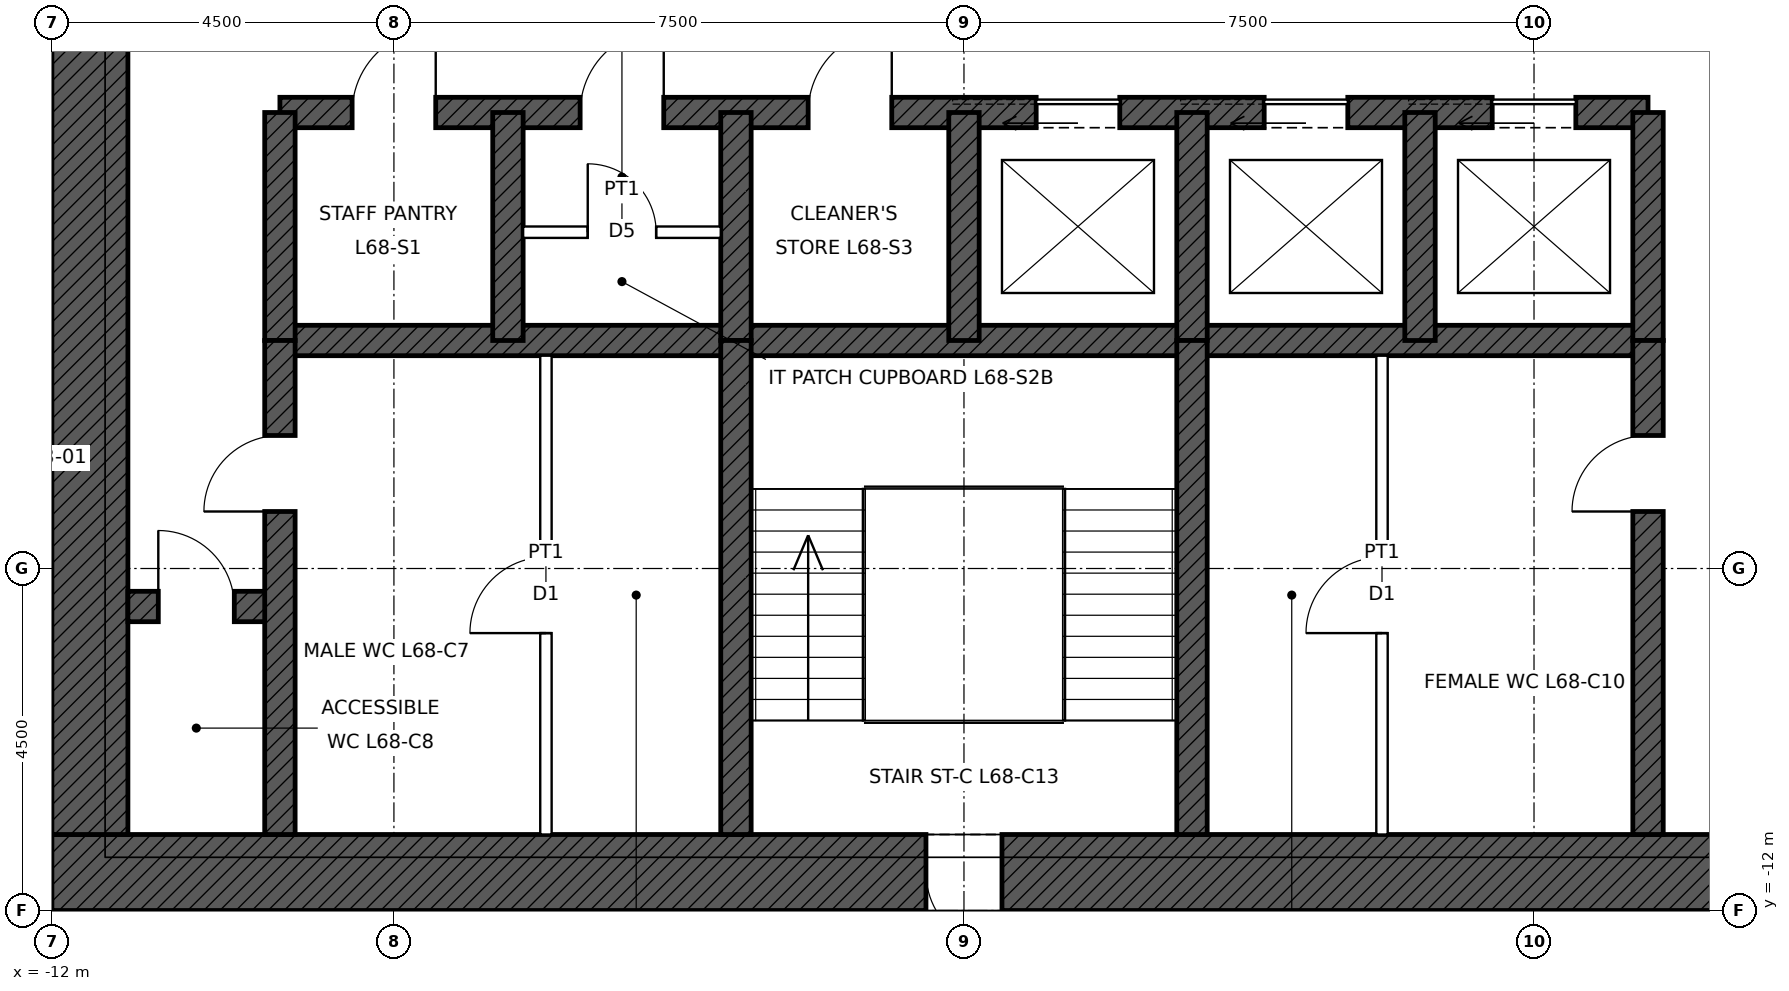
"""IFC4 building model, lengths in metres.
Left out: names, types, materials, properties, quantities, classifications, styles, units other than length and angle.
Written with IfcOpenShell. Run it as: python <this file> out.ifc"""

import sys

from ifc_helpers import new_model, si_unit, direction, frame, frame_2d, origin, place, context, subcontext, project, spatial, rectangle, extrude, element, fill, save


model = new_model("IFC4")
c1 = context("Model", 3, precision=1e-05, world=origin(), true_north=direction((0.0, 1.0)))
c2 = subcontext(c1, "Body", "Model", "MODEL_VIEW")
j1 = project(units=[si_unit("LENGTHUNIT", "METRE"), si_unit("PLANEANGLEUNIT", "RADIAN")], contexts=[c1])
p1 = place(None, origin())
s1 = spatial("IfcSite", under=j1, at=p1, CompositionType="ELEMENT")
p2 = place(p1, origin())
s2 = spatial("IfcBuilding", under=s1, at=p2, CompositionType="ELEMENT")
p3 = place(p2, frame((0.0, 0.0, 307.9)))
s3 = spatial("IfcBuildingStorey", under=s2, at=p3, CompositionType="ELEMENT", Elevation=307.9)
p4 = place(p3, frame((12.0, -11.5, 0.0), z_axis=(0.0, 0.0, 1.0), x_axis=(-1.0, 0.0, 0.0)))
e1 = element("IfcWall", 1, at=p4, inside=s3, PredefinedType="SHEAR", context=c2, shape_type="SweptSolid", body=[
    extrude(rectangle(XDim=24.0, YDim=1.0, at=frame_2d((12.0, 0.0))), origin(), (0.0, 0.0, 1.0), 4.0),
])
p5 = place(p4, frame((11.5, 0.0, 0.0)))
e2 = element("IfcOpeningElement", 2, at=p5, cuts=e1, PredefinedType="OPENING", context=c2, shape_type="SweptSolid", body=[
    extrude(rectangle(XDim=1.0, YDim=2.1, at=frame_2d((0.5, 1.05))), frame((0.0, 0.51, 0.0), z_axis=(0.0, -1.0, 0.0), x_axis=(1.0, 0.0, 0.0)), (0.0, 0.0, 1.0), 1.02),
])
p6 = place(p4, frame((1.0, 0.0, 0.0)))
e3 = element("IfcOpeningElement", 3, at=p6, cuts=e1, PredefinedType="OPENING", context=c2, shape_type="SweptSolid", body=[
    extrude(rectangle(XDim=1.0, YDim=2.4, at=frame_2d((0.5, 1.2))), frame((0.0, 0.51, 0.0), z_axis=(0.0, -1.0, 0.0), x_axis=(1.0, 0.0, 0.0)), (0.0, 0.0, 1.0), 1.02),
])
p7 = place(p3, frame((-11.5, -11.0, 0.0), z_axis=(0.0, 0.0, 1.0), x_axis=(0.0, 1.0, 0.0)))
e4 = element("IfcWall", 4, at=p7, inside=s3, PredefinedType="SHEAR", context=c2, shape_type="SweptSolid", body=[
    extrude(rectangle(XDim=22.0, YDim=1.0, at=frame_2d((11.0, 0.0))), origin(), (0.0, 0.0, 1.0), 4.0),
])
p8 = place(p7, frame((10.5, 0.0, 0.0)))
e5 = element("IfcOpeningElement", 5, at=p8, cuts=e4, PredefinedType="OPENING", context=c2, shape_type="SweptSolid", body=[
    extrude(rectangle(XDim=1.0, YDim=2.4, at=frame_2d((0.5, 1.2))), frame((0.0, 0.51, 0.0), z_axis=(0.0, -1.0, 0.0), x_axis=(1.0, 0.0, 0.0)), (0.0, 0.0, 1.0), 1.02),
])
p9 = place(p3, frame((-9.0, -1.5, 0.0), z_axis=(0.0, 0.0, 1.0), x_axis=(1.0, 0.0, 0.0)))
e6 = element("IfcWall", 6, at=p9, inside=s3, PredefinedType="SHEAR", context=c2, shape_type="SweptSolid", body=[
    extrude(rectangle(XDim=18.0, YDim=0.4, at=frame_2d((9.0, 0.0))), origin(), (0.0, 0.0, 1.0), 4.0),
])
p10 = place(p9, frame((9.95, 0.0, 0.0)))
e7 = element("IfcOpeningElement", 7, at=p10, cuts=e6, PredefinedType="OPENING", context=c2, shape_type="SweptSolid", body=[
    extrude(rectangle(XDim=1.1, YDim=2.1, at=frame_2d((0.55, 1.05))), frame((0.0, 0.21, 0.0), z_axis=(0.0, -1.0, 0.0), x_axis=(1.0, 0.0, 0.0)), (0.0, 0.0, 1.0), 0.42),
])
p11 = place(p9, frame((12.95, 0.0, 0.0)))
e8 = element("IfcOpeningElement", 8, at=p11, cuts=e6, PredefinedType="OPENING", context=c2, shape_type="SweptSolid", body=[
    extrude(rectangle(XDim=1.1, YDim=2.1, at=frame_2d((0.55, 1.05))), frame((0.0, 0.21, 0.0), z_axis=(0.0, -1.0, 0.0), x_axis=(1.0, 0.0, 0.0)), (0.0, 0.0, 1.0), 0.42),
])
p12 = place(p9, frame((15.95, 0.0, 0.0)))
e9 = element("IfcOpeningElement", 9, at=p12, cuts=e6, PredefinedType="OPENING", context=c2, shape_type="SweptSolid", body=[
    extrude(rectangle(XDim=1.1, YDim=2.1, at=frame_2d((0.55, 1.05))), frame((0.0, 0.21, 0.0), z_axis=(0.0, -1.0, 0.0), x_axis=(1.0, 0.0, 0.0)), (0.0, 0.0, 1.0), 0.42),
])
p13 = place(p9, frame((0.95, 0.0, 0.0)))
e10 = element("IfcOpeningElement", 10, at=p13, cuts=e6, PredefinedType="OPENING", context=c2, shape_type="SweptSolid", body=[
    extrude(rectangle(XDim=1.1, YDim=2.1, at=frame_2d((0.55, 1.05))), frame((0.0, 0.21, 0.0), z_axis=(0.0, -1.0, 0.0), x_axis=(1.0, 0.0, 0.0)), (0.0, 0.0, 1.0), 0.42),
])
p14 = place(p9, frame((3.95, 0.0, 0.0)))
e11 = element("IfcOpeningElement", 11, at=p14, cuts=e6, PredefinedType="OPENING", context=c2, shape_type="SweptSolid", body=[
    extrude(rectangle(XDim=1.1, YDim=2.1, at=frame_2d((0.55, 1.05))), frame((0.0, 0.21, 0.0), z_axis=(0.0, -1.0, 0.0), x_axis=(1.0, 0.0, 0.0)), (0.0, 0.0, 1.0), 0.42),
])
p15 = place(p9, frame((6.95, 0.0, 0.0)))
e12 = element("IfcOpeningElement", 12, at=p15, cuts=e6, PredefinedType="OPENING", context=c2, shape_type="SweptSolid", body=[
    extrude(rectangle(XDim=1.1, YDim=2.1, at=frame_2d((0.55, 1.05))), frame((0.0, 0.21, 0.0), z_axis=(0.0, -1.0, 0.0), x_axis=(1.0, 0.0, 0.0)), (0.0, 0.0, 1.0), 0.42),
])
p16 = place(p3, frame((-9.0, -4.5, 0.0), z_axis=(0.0, 0.0, 1.0), x_axis=(1.0, 0.0, 0.0)))
e13 = element("IfcWall", 13, at=p16, inside=s3, PredefinedType="SHEAR", context=c2, shape_type="SweptSolid", body=[
    extrude(rectangle(XDim=18.0, YDim=0.4, at=frame_2d((9.0, 0.0))), origin(), (0.0, 0.0, 1.0), 4.0),
])
p17 = place(p3, frame((-11.0, -8.0, 0.0), z_axis=(0.0, 0.0, 1.0), x_axis=(1.0, 0.0, 0.0)))
e14 = element("IfcWall", 14, at=p17, inside=s3, PredefinedType="SHEAR", context=c2, shape_type="SweptSolid", body=[
    extrude(rectangle(XDim=2.0, YDim=0.4, at=frame_2d((1.0, 0.0))), origin(), (0.0, 0.0, 1.0), 4.0),
])
p18 = place(p17, frame((0.4, 0.0, 0.0)))
e15 = element("IfcOpeningElement", 15, at=p18, cuts=e14, PredefinedType="OPENING", context=c2, shape_type="SweptSolid", body=[
    extrude(rectangle(XDim=1.0, YDim=2.1, at=frame_2d((0.5, 1.05))), frame((0.0, 0.21, 0.0), z_axis=(0.0, -1.0, 0.0), x_axis=(1.0, 0.0, 0.0)), (0.0, 0.0, 1.0), 0.42),
])
for number, where, z_axis, x_axis in (
    (16, (-9.0, -4.5, 0.0), (0.0, 0.0, 1.0), (0.0, 1.0, 0.0)),
    (17, (9.0, -4.5, 0.0), (0.0, 0.0, 1.0), (0.0, 1.0, 0.0)),
    (18, (-6.0, -4.5, 0.0), (0.0, 0.0, 1.0), (0.0, 1.0, 0.0)),
    (19, (-3.0, -4.5, 0.0), (0.0, 0.0, 1.0), (0.0, 1.0, 0.0)),
    (20, (0.0, -4.5, 0.0), (0.0, 0.0, 1.0), (0.0, 1.0, 0.0)),
    (21, (3.0, -4.5, 0.0), (0.0, 0.0, 1.0), (0.0, 1.0, 0.0)),
    (22, (6.0, -4.5, 0.0), (0.0, 0.0, 1.0), (0.0, 1.0, 0.0)),
):
    element("IfcWall", number, at=place(p3, frame(where, z_axis=z_axis, x_axis=x_axis)), inside=s3, PredefinedType="SHEAR", context=c2, shape_type="SweptSolid", body=[
        extrude(rectangle(XDim=3.0, YDim=0.4, at=frame_2d((1.5, 0.0))), origin(), (0.0, 0.0, 1.0), 4.0),
    ])
p19 = place(p3, frame((-9.0, -11.0, 0.0), z_axis=(0.0, 0.0, 1.0), x_axis=(0.0, 1.0, 0.0)))
e23 = element("IfcWall", 23, at=p19, inside=s3, PredefinedType="SHEAR", context=c2, shape_type="SweptSolid", body=[
    extrude(rectangle(XDim=6.5, YDim=0.4, at=frame_2d((3.25, 0.0))), origin(), (0.0, 0.0, 1.0), 4.0),
])
p20 = place(p19, frame((4.25, 0.0, 0.0)))
e24 = element("IfcOpeningElement", 24, at=p20, cuts=e23, PredefinedType="OPENING", context=c2, shape_type="SweptSolid", body=[
    extrude(rectangle(XDim=1.0, YDim=2.1, at=frame_2d((0.5, 1.05))), frame((0.0, 0.21, 0.0), z_axis=(0.0, -1.0, 0.0), x_axis=(1.0, 0.0, 0.0)), (0.0, 0.0, 1.0), 0.42),
])
p21 = place(p3, frame((9.0, -11.0, 0.0), z_axis=(0.0, 0.0, 1.0), x_axis=(0.0, 1.0, 0.0)))
e25 = element("IfcWall", 25, at=p21, inside=s3, PredefinedType="SHEAR", context=c2, shape_type="SweptSolid", body=[
    extrude(rectangle(XDim=6.5, YDim=0.4, at=frame_2d((3.25, 0.0))), origin(), (0.0, 0.0, 1.0), 4.0),
])
p22 = place(p21, frame((4.25, 0.0, 0.0)))
e26 = element("IfcOpeningElement", 26, at=p22, cuts=e25, PredefinedType="OPENING", context=c2, shape_type="SweptSolid", body=[
    extrude(rectangle(XDim=1.0, YDim=2.1, at=frame_2d((0.5, 1.05))), frame((0.0, 0.21, 0.0), z_axis=(0.0, -1.0, 0.0), x_axis=(1.0, 0.0, 0.0)), (0.0, 0.0, 1.0), 0.42),
])
for number, where, z_axis, x_axis in (
    (27, (-3.0, -11.0, 0.0), (0.0, 0.0, 1.0), (0.0, 1.0, 0.0)),
    (28, (3.0, -11.0, 0.0), (0.0, 0.0, 1.0), (0.0, 1.0, 0.0)),
):
    element("IfcWall", number, at=place(p3, frame(where, z_axis=z_axis, x_axis=x_axis)), inside=s3, PredefinedType="SHEAR", context=c2, shape_type="SweptSolid", body=[
        extrude(rectangle(XDim=6.5, YDim=0.4, at=frame_2d((3.25, 0.0))), origin(), (0.0, 0.0, 1.0), 4.0),
    ])
p23 = place(p3, frame((-5.5, -11.0, 0.0), z_axis=(0.0, 0.0, 1.0), x_axis=(0.0, 1.0, 0.0)))
e29 = element("IfcWall", 29, at=p23, inside=s3, PredefinedType="PARTITIONING", context=c2, shape_type="SweptSolid", body=[
    extrude(rectangle(XDim=6.3, YDim=0.15, at=frame_2d((3.15, 0.0))), origin(), (0.0, 0.0, 1.0), 3.75),
])
p24 = place(p23, frame((2.65, 0.0, 0.0)))
e30 = element("IfcOpeningElement", 30, at=p24, cuts=e29, PredefinedType="OPENING", context=c2, shape_type="SweptSolid", body=[
    extrude(rectangle(XDim=1.0, YDim=2.1, at=frame_2d((0.5, 1.05))), frame((0.0, 0.085, 0.0), z_axis=(0.0, -1.0, 0.0), x_axis=(1.0, 0.0, 0.0)), (0.0, 0.0, 1.0), 0.17),
])
p25 = place(p3, frame((5.5, -11.0, 0.0), z_axis=(0.0, 0.0, 1.0), x_axis=(0.0, 1.0, 0.0)))
e31 = element("IfcWall", 31, at=p25, inside=s3, PredefinedType="PARTITIONING", context=c2, shape_type="SweptSolid", body=[
    extrude(rectangle(XDim=6.3, YDim=0.15, at=frame_2d((3.15, 0.0))), origin(), (0.0, 0.0, 1.0), 3.75),
])
p26 = place(p25, frame((2.65, 0.0, 0.0)))
e32 = element("IfcOpeningElement", 32, at=p26, cuts=e31, PredefinedType="OPENING", context=c2, shape_type="SweptSolid", body=[
    extrude(rectangle(XDim=1.0, YDim=2.1, at=frame_2d((0.5, 1.05))), frame((0.0, 0.085, 0.0), z_axis=(0.0, -1.0, 0.0), x_axis=(1.0, 0.0, 0.0)), (0.0, 0.0, 1.0), 0.17),
])
p27 = place(p3, frame((-5.8, -3.075, 0.0), z_axis=(0.0, 0.0, 1.0), x_axis=(1.0, 0.0, 0.0)))
e33 = element("IfcWall", 33, at=p27, inside=s3, PredefinedType="PARTITIONING", context=c2, shape_type="SweptSolid", body=[
    extrude(rectangle(XDim=2.6, YDim=0.15, at=frame_2d((1.3, 0.0))), origin(), (0.0, 0.0, 1.0), 3.75),
])
p28 = place(p27, frame((0.85, 0.0, 0.0)))
e34 = element("IfcOpeningElement", 34, at=p28, cuts=e33, PredefinedType="OPENING", context=c2, shape_type="SweptSolid", body=[
    extrude(rectangle(XDim=0.9, YDim=2.1, at=frame_2d((0.45, 1.05))), frame((0.0, 0.085, 0.0), z_axis=(0.0, -1.0, 0.0), x_axis=(1.0, 0.0, 0.0)), (0.0, 0.0, 1.0), 0.17),
])
p29 = place(p5, origin())
e35 = element("IfcDoor", 35, at=p29, inside=s3, OperationType="SINGLE_SWING_LEFT", PredefinedType="DOOR", context=c2, shape_type="SweptSolid", body=[
    extrude(rectangle(XDim=1.0, YDim=2.1, at=frame_2d((0.5, 1.05))), frame((0.0, 0.485, 0.0), z_axis=(0.0, -1.0, 0.0), x_axis=(1.0, 0.0, 0.0)), (0.0, 0.0, 1.0), 0.05),
])
fill(e2, e35)
p30 = place(p20, origin())
e36 = element("IfcDoor", 36, at=p30, inside=s3, OperationType="SINGLE_SWING_LEFT", PredefinedType="DOOR", context=c2, shape_type="SweptSolid", body=[
    extrude(rectangle(XDim=1.0, YDim=2.1, at=frame_2d((0.5, 1.05))), frame((0.0, 0.025, 0.0), z_axis=(0.0, -1.0, 0.0), x_axis=(1.0, 0.0, 0.0)), (0.0, 0.0, 1.0), 0.05),
])
fill(e24, e36)
p31 = place(p22, origin())
e37 = element("IfcDoor", 37, at=p31, inside=s3, OperationType="SINGLE_SWING_LEFT", PredefinedType="DOOR", context=c2, shape_type="SweptSolid", body=[
    extrude(rectangle(XDim=1.0, YDim=2.1, at=frame_2d((0.5, 1.05))), frame((0.0, 0.025, 0.0), z_axis=(0.0, -1.0, 0.0), x_axis=(1.0, 0.0, 0.0)), (0.0, 0.0, 1.0), 0.05),
])
fill(e26, e37)
p32 = place(p18, origin())
e38 = element("IfcDoor", 38, at=p32, inside=s3, OperationType="SINGLE_SWING_LEFT", PredefinedType="DOOR", context=c2, shape_type="SweptSolid", body=[
    extrude(rectangle(XDim=1.0, YDim=2.1, at=frame_2d((0.5, 1.05))), frame((0.0, 0.025, 0.0), z_axis=(0.0, -1.0, 0.0), x_axis=(1.0, 0.0, 0.0)), (0.0, 0.0, 1.0), 0.05),
])
fill(e15, e38)
p33 = place(p10, origin())
e39 = element("IfcDoor", 39, at=p33, inside=s3, OperationType="SLIDING_TO_LEFT", PredefinedType="DOOR", context=c2, shape_type="SweptSolid", body=[
    extrude(rectangle(XDim=1.1, YDim=2.1, at=frame_2d((0.55, 1.05))), frame((0.0, 0.025, 0.0), z_axis=(0.0, -1.0, 0.0), x_axis=(1.0, 0.0, 0.0)), (0.0, 0.0, 1.0), 0.05),
])
fill(e7, e39)
p34 = place(p11, origin())
e40 = element("IfcDoor", 40, at=p34, inside=s3, OperationType="SLIDING_TO_LEFT", PredefinedType="DOOR", context=c2, shape_type="SweptSolid", body=[
    extrude(rectangle(XDim=1.1, YDim=2.1, at=frame_2d((0.55, 1.05))), frame((0.0, 0.025, 0.0), z_axis=(0.0, -1.0, 0.0), x_axis=(1.0, 0.0, 0.0)), (0.0, 0.0, 1.0), 0.05),
])
fill(e8, e40)
p35 = place(p12, origin())
e41 = element("IfcDoor", 41, at=p35, inside=s3, OperationType="SLIDING_TO_LEFT", PredefinedType="DOOR", context=c2, shape_type="SweptSolid", body=[
    extrude(rectangle(XDim=1.1, YDim=2.1, at=frame_2d((0.55, 1.05))), frame((0.0, 0.025, 0.0), z_axis=(0.0, -1.0, 0.0), x_axis=(1.0, 0.0, 0.0)), (0.0, 0.0, 1.0), 0.05),
])
fill(e9, e41)
p36 = place(p24, origin())
e42 = element("IfcDoor", 42, at=p36, inside=s3, OperationType="SINGLE_SWING_LEFT", PredefinedType="DOOR", context=c2, shape_type="SweptSolid", body=[
    extrude(rectangle(XDim=1.0, YDim=2.1, at=frame_2d((0.5, 1.05))), frame((0.0, 0.025, 0.0), z_axis=(0.0, -1.0, 0.0), x_axis=(1.0, 0.0, 0.0)), (0.0, 0.0, 1.0), 0.05),
])
fill(e30, e42)
p37 = place(p26, origin())
e43 = element("IfcDoor", 43, at=p37, inside=s3, OperationType="SINGLE_SWING_LEFT", PredefinedType="DOOR", context=c2, shape_type="SweptSolid", body=[
    extrude(rectangle(XDim=1.0, YDim=2.1, at=frame_2d((0.5, 1.05))), frame((0.0, 0.025, 0.0), z_axis=(0.0, -1.0, 0.0), x_axis=(1.0, 0.0, 0.0)), (0.0, 0.0, 1.0), 0.05),
])
fill(e32, e43)
p38 = place(p13, origin())
e44 = element("IfcDoor", 44, at=p38, inside=s3, OperationType="SINGLE_SWING_RIGHT", PredefinedType="DOOR", context=c2, shape_type="SweptSolid", body=[
    extrude(rectangle(XDim=1.1, YDim=2.1, at=frame_2d((0.55, 1.05))), frame((0.0, 0.025, 0.0), z_axis=(0.0, -1.0, 0.0), x_axis=(1.0, 0.0, 0.0)), (0.0, 0.0, 1.0), 0.05),
])
fill(e10, e44)
p39 = place(p14, origin())
e45 = element("IfcDoor", 45, at=p39, inside=s3, OperationType="SINGLE_SWING_RIGHT", PredefinedType="DOOR", context=c2, shape_type="SweptSolid", body=[
    extrude(rectangle(XDim=1.1, YDim=2.1, at=frame_2d((0.55, 1.05))), frame((0.0, 0.025, 0.0), z_axis=(0.0, -1.0, 0.0), x_axis=(1.0, 0.0, 0.0)), (0.0, 0.0, 1.0), 0.05),
])
fill(e11, e45)
p40 = place(p28, origin())
e46 = element("IfcDoor", 46, at=p40, inside=s3, OperationType="SINGLE_SWING_LEFT", PredefinedType="DOOR", context=c2, shape_type="SweptSolid", body=[
    extrude(rectangle(XDim=0.9, YDim=2.1, at=frame_2d((0.45, 1.05))), frame((0.0, 0.025, 0.0), z_axis=(0.0, -1.0, 0.0), x_axis=(1.0, 0.0, 0.0)), (0.0, 0.0, 1.0), 0.05),
])
fill(e34, e46)
p41 = place(p15, origin())
e47 = element("IfcDoor", 47, at=p41, inside=s3, OperationType="SINGLE_SWING_RIGHT", PredefinedType="DOOR", context=c2, shape_type="SweptSolid", body=[
    extrude(rectangle(XDim=1.1, YDim=2.1, at=frame_2d((0.55, 1.05))), frame((0.0, 0.025, 0.0), z_axis=(0.0, -1.0, 0.0), x_axis=(1.0, 0.0, 0.0)), (0.0, 0.0, 1.0), 0.05),
])
fill(e12, e47)
save(model, sys.argv[1])
